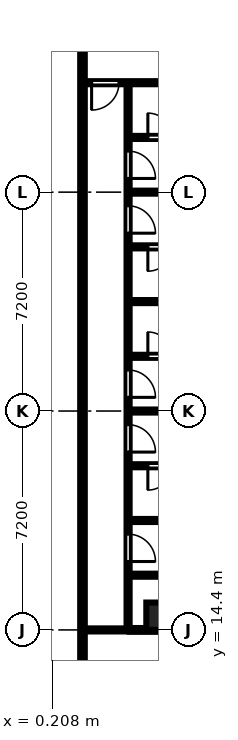
"""IFC4 building model, lengths in metres.
Left out: names, types, materials, properties, quantities, classifications, styles, units other than length and angle.
Written with IfcOpenShell. Run it as: python <this file> out.ifc"""

import sys

from ifc_helpers import new_model, si_unit, direction, frame, frame_2d, origin, origin_2d, place, context, subcontext, project, spatial, rectangle, extrude, element, fill, save


model = new_model("IFC4")
c1 = context("Model", 3, precision=1e-05, world=origin(), true_north=direction((0.0, 1.0)))
c2 = subcontext(c1, "Body", "Model", "MODEL_VIEW")
j1 = project(units=[si_unit("LENGTHUNIT", "METRE"), si_unit("PLANEANGLEUNIT", "RADIAN")], contexts=[c1])
p1 = place(None, origin())
s1 = spatial("IfcSite", under=j1, at=p1, CompositionType="ELEMENT")
p2 = place(p1, origin())
s2 = spatial("IfcBuilding", under=s1, at=p2, CompositionType="ELEMENT")
p3 = place(p2, frame((0.0, 0.0, 35.7)))
s3 = spatial("IfcBuildingStorey", under=s2, at=p3, CompositionType="ELEMENT", Elevation=35.7)
p4 = place(p3, frame((3.75, 14.85, 0.0), z_axis=(0.0, 0.0, 1.0), x_axis=(1.0, 0.0, 0.0)))
e1 = element("IfcColumn", 1, at=p4, inside=s3, PredefinedType="COLUMN", context=c2, shape_type="SweptSolid", body=[
    extrude(rectangle(XDim=0.9, YDim=0.9, at=origin_2d()), origin(), (0.0, 0.0, 1.0), 3.0),
])
p5 = place(p3, frame((1.2, 1.125, 0.0), z_axis=(0.0, 0.0, 1.0), x_axis=(0.0, 1.0, 0.0)))
e2 = element("IfcWall", 2, at=p5, inside=s3, PredefinedType="PARTITIONING", context=c2, shape_type="SweptSolid", body=[
    extrude(rectangle(XDim=35.375, YDim=0.15, at=frame_2d((17.688, 0.0))), origin(), (0.0, 0.0, 1.0), 2.575),
])
p6 = place(p5, frame((4.125, 0.0, 0.0)))
e3 = element("IfcOpeningElement", 3, at=p6, cuts=e2, PredefinedType="OPENING", context=c2, shape_type="SweptSolid", body=[
    extrude(rectangle(XDim=0.9, YDim=2.1, at=frame_2d((0.45, 1.05))), frame((0.0, 0.085, 0.0), z_axis=(0.0, -1.0, 0.0), x_axis=(1.0, 0.0, 0.0)), (0.0, 0.0, 1.0), 0.17),
])
p7 = place(p5, frame((7.025, 0.0, 0.0)))
e4 = element("IfcOpeningElement", 4, at=p7, cuts=e2, PredefinedType="OPENING", context=c2, shape_type="SweptSolid", body=[
    extrude(rectangle(XDim=0.9, YDim=2.1, at=frame_2d((0.45, 1.05))), frame((0.0, 0.085, 0.0), z_axis=(0.0, -1.0, 0.0), x_axis=(1.0, 0.0, 0.0)), (0.0, 0.0, 1.0), 0.17),
])
p8 = place(p5, frame((10.625, 0.0, 0.0)))
e5 = element("IfcOpeningElement", 5, at=p8, cuts=e2, PredefinedType="OPENING", context=c2, shape_type="SweptSolid", body=[
    extrude(rectangle(XDim=0.9, YDim=2.1, at=frame_2d((0.45, 1.05))), frame((0.0, 0.085, 0.0), z_axis=(0.0, -1.0, 0.0), x_axis=(1.0, 0.0, 0.0)), (0.0, 0.0, 1.0), 0.17),
])
p9 = place(p5, frame((32.825, 0.0, 0.0)))
e6 = element("IfcOpeningElement", 6, at=p9, cuts=e2, PredefinedType="OPENING", context=c2, shape_type="SweptSolid", body=[
    extrude(rectangle(XDim=1.0, YDim=2.1, at=frame_2d((0.5, 1.05))), frame((0.0, 0.085, 0.0), z_axis=(0.0, -1.0, 0.0), x_axis=(1.0, 0.0, 0.0)), (0.0, 0.0, 1.0), 0.17),
])
p10 = place(p3, frame((1.275, 14.4, 0.0), z_axis=(0.0, 0.0, 1.0), x_axis=(1.0, 0.0, 0.0)))
e7 = element("IfcWall", 7, at=p10, inside=s3, PredefinedType="PARTITIONING", context=c2, shape_type="SweptSolid", body=[
    extrude(rectangle(XDim=1.425, YDim=0.1, at=frame_2d((0.712, 0.0))), origin(), (0.0, 0.0, 1.0), 2.575),
])
p11 = place(p3, frame((1.275, 32.4, 0.0), z_axis=(0.0, 0.0, 1.0), x_axis=(1.0, 0.0, 0.0)))
e8 = element("IfcWall", 8, at=p11, inside=s3, PredefinedType="PARTITIONING", context=c2, shape_type="SweptSolid", body=[
    extrude(rectangle(XDim=5.625, YDim=0.1, at=frame_2d((2.812, 0.0))), origin(), (0.0, 0.0, 1.0), 2.575),
])
p12 = place(p11, frame((0.225, 0.0, 0.0)))
e9 = element("IfcOpeningElement", 9, at=p12, cuts=e8, PredefinedType="OPENING", context=c2, shape_type="SweptSolid", body=[
    extrude(rectangle(XDim=0.9, YDim=2.1, at=frame_2d((0.45, 1.05))), frame((0.0, 0.06, 0.0), z_axis=(0.0, -1.0, 0.0), x_axis=(1.0, 0.0, 0.0)), (0.0, 0.0, 1.0), 0.12),
])
p13 = place(p3, frame((2.7, 14.462, 0.0), z_axis=(0.0, 0.0, 1.0), x_axis=(0.0, 1.0, 0.0)))
e10 = element("IfcWall", 10, at=p13, inside=s3, PredefinedType="PARTITIONING", context=c2, shape_type="SweptSolid", body=[
    extrude(rectangle(XDim=17.888, YDim=0.1, at=frame_2d((8.944, 0.0))), origin(), (0.0, 0.0, 1.0), 2.575),
])
p14 = place(p13, frame((2.188, 0.0, 0.0)))
e11 = element("IfcOpeningElement", 11, at=p14, cuts=e10, PredefinedType="OPENING", context=c2, shape_type="SweptSolid", body=[
    extrude(rectangle(XDim=0.9, YDim=2.1, at=frame_2d((0.45, 1.05))), frame((0.0, 0.06, 0.0), z_axis=(0.0, -1.0, 0.0), x_axis=(1.0, 0.0, 0.0)), (0.0, 0.0, 1.0), 0.12),
])
p15 = place(p13, frame((5.788, 0.0, 0.0)))
e12 = element("IfcOpeningElement", 12, at=p15, cuts=e10, PredefinedType="OPENING", context=c2, shape_type="SweptSolid", body=[
    extrude(rectangle(XDim=0.9, YDim=2.1, at=frame_2d((0.45, 1.05))), frame((0.0, 0.06, 0.0), z_axis=(0.0, -1.0, 0.0), x_axis=(1.0, 0.0, 0.0)), (0.0, 0.0, 1.0), 0.12),
])
p16 = place(p13, frame((7.587, 0.0, 0.0)))
e13 = element("IfcOpeningElement", 13, at=p16, cuts=e10, PredefinedType="OPENING", context=c2, shape_type="SweptSolid", body=[
    extrude(rectangle(XDim=0.9, YDim=2.1, at=frame_2d((0.45, 1.05))), frame((0.0, 0.06, 0.0), z_axis=(0.0, -1.0, 0.0), x_axis=(1.0, 0.0, 0.0)), (0.0, 0.0, 1.0), 0.12),
])
p17 = place(p13, frame((12.988, 0.0, 0.0)))
e14 = element("IfcOpeningElement", 14, at=p17, cuts=e10, PredefinedType="OPENING", context=c2, shape_type="SweptSolid", body=[
    extrude(rectangle(XDim=0.9, YDim=2.1, at=frame_2d((0.45, 1.05))), frame((0.0, 0.06, 0.0), z_axis=(0.0, -1.0, 0.0), x_axis=(1.0, 0.0, 0.0)), (0.0, 0.0, 1.0), 0.12),
])
p18 = place(p13, frame((14.788, 0.0, 0.0)))
e15 = element("IfcOpeningElement", 15, at=p18, cuts=e10, PredefinedType="OPENING", context=c2, shape_type="SweptSolid", body=[
    extrude(rectangle(XDim=0.9, YDim=2.1, at=frame_2d((0.45, 1.05))), frame((0.0, 0.06, 0.0), z_axis=(0.0, -1.0, 0.0), x_axis=(1.0, 0.0, 0.0)), (0.0, 0.0, 1.0), 0.12),
])
p19 = place(p3, frame((2.7, 14.4, 0.0), z_axis=(0.0, 0.0, 1.0), x_axis=(1.0, 0.0, 0.0)))
e16 = element("IfcWall", 16, at=p19, inside=s3, PredefinedType="PARTITIONING", context=c2, shape_type="SweptSolid", body=[
    extrude(rectangle(XDim=1.2, YDim=0.125, at=frame_2d((0.6, 0.0))), origin(), (0.0, 0.0, 1.0), 2.575),
])
p20 = place(p3, frame((2.75, 16.2, 0.0), z_axis=(0.0, 0.0, 1.0), x_axis=(1.0, 0.0, 0.0)))
e17 = element("IfcWall", 17, at=p20, inside=s3, PredefinedType="PARTITIONING", context=c2, shape_type="SweptSolid", body=[
    extrude(rectangle(XDim=2.1, YDim=0.1, at=frame_2d((1.05, 0.0))), origin(), (0.0, 0.0, 1.0), 2.575),
])
p21 = place(p3, frame((2.75, 18.0, 0.0), z_axis=(0.0, 0.0, 1.0), x_axis=(1.0, 0.0, 0.0)))
e18 = element("IfcWall", 18, at=p21, inside=s3, PredefinedType="PARTITIONING", context=c2, shape_type="SweptSolid", body=[
    extrude(rectangle(XDim=4.15, YDim=0.1, at=frame_2d((2.075, 0.0))), origin(), (0.0, 0.0, 1.0), 2.575),
])
p22 = place(p3, frame((2.75, 19.8, 0.0), z_axis=(0.0, 0.0, 1.0), x_axis=(1.0, 0.0, 0.0)))
e19 = element("IfcWall", 19, at=p22, inside=s3, PredefinedType="PARTITIONING", context=c2, shape_type="SweptSolid", body=[
    extrude(rectangle(XDim=2.1, YDim=0.1, at=frame_2d((1.05, 0.0))), origin(), (0.0, 0.0, 1.0), 2.575),
])
p23 = place(p22, frame((0.6, 0.0, 0.0)))
e20 = element("IfcOpeningElement", 20, at=p23, cuts=e19, PredefinedType="OPENING", context=c2, shape_type="SweptSolid", body=[
    extrude(rectangle(XDim=0.8, YDim=2.1, at=frame_2d((0.4, 1.05))), frame((0.0, 0.06, 0.0), z_axis=(0.0, -1.0, 0.0), x_axis=(1.0, 0.0, 0.0)), (0.0, 0.0, 1.0), 0.12),
])
p24 = place(p3, frame((2.75, 21.6, 0.0), z_axis=(0.0, 0.0, 1.0), x_axis=(1.0, 0.0, 0.0)))
e21 = element("IfcWall", 21, at=p24, inside=s3, PredefinedType="PARTITIONING", context=c2, shape_type="SweptSolid", body=[
    extrude(rectangle(XDim=4.15, YDim=0.1, at=frame_2d((2.075, 0.0))), origin(), (0.0, 0.0, 1.0), 2.575),
])
p25 = place(p3, frame((2.75, 23.4, 0.0), z_axis=(0.0, 0.0, 1.0), x_axis=(1.0, 0.0, 0.0)))
e22 = element("IfcWall", 22, at=p25, inside=s3, PredefinedType="PARTITIONING", context=c2, shape_type="SweptSolid", body=[
    extrude(rectangle(XDim=2.1, YDim=0.1, at=frame_2d((1.05, 0.0))), origin(), (0.0, 0.0, 1.0), 2.575),
])
p26 = place(p25, frame((0.6, 0.0, 0.0)))
e23 = element("IfcOpeningElement", 23, at=p26, cuts=e22, PredefinedType="OPENING", context=c2, shape_type="SweptSolid", body=[
    extrude(rectangle(XDim=0.8, YDim=2.1, at=frame_2d((0.4, 1.05))), frame((0.0, 0.06, 0.0), z_axis=(0.0, -1.0, 0.0), x_axis=(1.0, 0.0, 0.0)), (0.0, 0.0, 1.0), 0.12),
])
p27 = place(p3, frame((2.75, 25.2, 0.0), z_axis=(0.0, 0.0, 1.0), x_axis=(1.0, 0.0, 0.0)))
e24 = element("IfcWall", 24, at=p27, inside=s3, PredefinedType="PARTITIONING", context=c2, shape_type="SweptSolid", body=[
    extrude(rectangle(XDim=4.15, YDim=0.1, at=frame_2d((2.075, 0.0))), origin(), (0.0, 0.0, 1.0), 2.575),
])
p28 = place(p3, frame((2.75, 27.0, 0.0), z_axis=(0.0, 0.0, 1.0), x_axis=(1.0, 0.0, 0.0)))
e25 = element("IfcWall", 25, at=p28, inside=s3, PredefinedType="PARTITIONING", context=c2, shape_type="SweptSolid", body=[
    extrude(rectangle(XDim=2.1, YDim=0.1, at=frame_2d((1.05, 0.0))), origin(), (0.0, 0.0, 1.0), 2.575),
])
p29 = place(p28, frame((0.6, 0.0, 0.0)))
e26 = element("IfcOpeningElement", 26, at=p29, cuts=e25, PredefinedType="OPENING", context=c2, shape_type="SweptSolid", body=[
    extrude(rectangle(XDim=0.8, YDim=2.1, at=frame_2d((0.4, 1.05))), frame((0.0, 0.06, 0.0), z_axis=(0.0, -1.0, 0.0), x_axis=(1.0, 0.0, 0.0)), (0.0, 0.0, 1.0), 0.12),
])
p30 = place(p3, frame((2.75, 28.8, 0.0), z_axis=(0.0, 0.0, 1.0), x_axis=(1.0, 0.0, 0.0)))
e27 = element("IfcWall", 27, at=p30, inside=s3, PredefinedType="PARTITIONING", context=c2, shape_type="SweptSolid", body=[
    extrude(rectangle(XDim=4.15, YDim=0.1, at=frame_2d((2.075, 0.0))), origin(), (0.0, 0.0, 1.0), 2.575),
])
p31 = place(p3, frame((2.75, 30.6, 0.0), z_axis=(0.0, 0.0, 1.0), x_axis=(1.0, 0.0, 0.0)))
e28 = element("IfcWall", 28, at=p31, inside=s3, PredefinedType="PARTITIONING", context=c2, shape_type="SweptSolid", body=[
    extrude(rectangle(XDim=2.1, YDim=0.1, at=frame_2d((1.05, 0.0))), origin(), (0.0, 0.0, 1.0), 2.575),
])
p32 = place(p31, frame((0.6, 0.0, 0.0)))
e29 = element("IfcOpeningElement", 29, at=p32, cuts=e28, PredefinedType="OPENING", context=c2, shape_type="SweptSolid", body=[
    extrude(rectangle(XDim=0.8, YDim=2.1, at=frame_2d((0.4, 1.05))), frame((0.0, 0.06, 0.0), z_axis=(0.0, -1.0, 0.0), x_axis=(1.0, 0.0, 0.0)), (0.0, 0.0, 1.0), 0.12),
])
p33 = place(p12, frame((0.9, 0.0, 0.0), z_axis=(0.0, 0.0, 1.0), x_axis=(-1.0, 0.0, 0.0)))
e30 = element("IfcDoor", 30, at=p33, inside=s3, OperationType="SINGLE_SWING_RIGHT", PredefinedType="DOOR", context=c2, shape_type="SweptSolid", body=[
    extrude(rectangle(XDim=0.9, YDim=2.1, at=frame_2d((0.45, 1.05))), frame((0.0, 0.025, 0.0), z_axis=(0.0, -1.0, 0.0), x_axis=(1.0, 0.0, 0.0)), (0.0, 0.0, 1.0), 0.05),
])
fill(e9, e30)
p34 = place(p14, frame((0.9, 0.0, 0.0), z_axis=(0.0, 0.0, 1.0), x_axis=(-1.0, 0.0, 0.0)))
e31 = element("IfcDoor", 31, at=p34, inside=s3, OperationType="SINGLE_SWING_RIGHT", PredefinedType="DOOR", context=c2, shape_type="SweptSolid", body=[
    extrude(rectangle(XDim=0.9, YDim=2.1, at=frame_2d((0.45, 1.05))), frame((0.0, 0.025, 0.0), z_axis=(0.0, -1.0, 0.0), x_axis=(1.0, 0.0, 0.0)), (0.0, 0.0, 1.0), 0.05),
])
fill(e11, e31)
p35 = place(p15, frame((0.9, 0.0, 0.0), z_axis=(0.0, 0.0, 1.0), x_axis=(-1.0, 0.0, 0.0)))
e32 = element("IfcDoor", 32, at=p35, inside=s3, OperationType="SINGLE_SWING_RIGHT", PredefinedType="DOOR", context=c2, shape_type="SweptSolid", body=[
    extrude(rectangle(XDim=0.9, YDim=2.1, at=frame_2d((0.45, 1.05))), frame((0.0, 0.025, 0.0), z_axis=(0.0, -1.0, 0.0), x_axis=(1.0, 0.0, 0.0)), (0.0, 0.0, 1.0), 0.05),
])
fill(e12, e32)
p36 = place(p16, frame((0.9, 0.0, 0.0), z_axis=(0.0, 0.0, 1.0), x_axis=(-1.0, 0.0, 0.0)))
e33 = element("IfcDoor", 33, at=p36, inside=s3, OperationType="SINGLE_SWING_RIGHT", PredefinedType="DOOR", context=c2, shape_type="SweptSolid", body=[
    extrude(rectangle(XDim=0.9, YDim=2.1, at=frame_2d((0.45, 1.05))), frame((0.0, 0.025, 0.0), z_axis=(0.0, -1.0, 0.0), x_axis=(1.0, 0.0, 0.0)), (0.0, 0.0, 1.0), 0.05),
])
fill(e13, e33)
p37 = place(p17, frame((0.9, 0.0, 0.0), z_axis=(0.0, 0.0, 1.0), x_axis=(-1.0, 0.0, 0.0)))
e34 = element("IfcDoor", 34, at=p37, inside=s3, OperationType="SINGLE_SWING_RIGHT", PredefinedType="DOOR", context=c2, shape_type="SweptSolid", body=[
    extrude(rectangle(XDim=0.9, YDim=2.1, at=frame_2d((0.45, 1.05))), frame((0.0, 0.025, 0.0), z_axis=(0.0, -1.0, 0.0), x_axis=(1.0, 0.0, 0.0)), (0.0, 0.0, 1.0), 0.05),
])
fill(e14, e34)
p38 = place(p18, frame((0.9, 0.0, 0.0), z_axis=(0.0, 0.0, 1.0), x_axis=(-1.0, 0.0, 0.0)))
e35 = element("IfcDoor", 35, at=p38, inside=s3, OperationType="SINGLE_SWING_RIGHT", PredefinedType="DOOR", context=c2, shape_type="SweptSolid", body=[
    extrude(rectangle(XDim=0.9, YDim=2.1, at=frame_2d((0.45, 1.05))), frame((0.0, 0.025, 0.0), z_axis=(0.0, -1.0, 0.0), x_axis=(1.0, 0.0, 0.0)), (0.0, 0.0, 1.0), 0.05),
])
fill(e15, e35)
p39 = place(p23, frame((0.8, 0.0, 0.0), z_axis=(0.0, 0.0, 1.0), x_axis=(-1.0, 0.0, 0.0)))
e36 = element("IfcDoor", 36, at=p39, inside=s3, OperationType="SINGLE_SWING_RIGHT", PredefinedType="DOOR", context=c2, shape_type="SweptSolid", body=[
    extrude(rectangle(XDim=0.8, YDim=2.1, at=frame_2d((0.4, 1.05))), frame((0.0, 0.025, 0.0), z_axis=(0.0, -1.0, 0.0), x_axis=(1.0, 0.0, 0.0)), (0.0, 0.0, 1.0), 0.05),
])
fill(e20, e36)
p40 = place(p26, origin())
e37 = element("IfcDoor", 37, at=p40, inside=s3, OperationType="SINGLE_SWING_LEFT", PredefinedType="DOOR", context=c2, shape_type="SweptSolid", body=[
    extrude(rectangle(XDim=0.8, YDim=2.1, at=frame_2d((0.4, 1.05))), frame((0.0, 0.025, 0.0), z_axis=(0.0, -1.0, 0.0), x_axis=(1.0, 0.0, 0.0)), (0.0, 0.0, 1.0), 0.05),
])
fill(e23, e37)
p41 = place(p29, frame((0.8, 0.0, 0.0), z_axis=(0.0, 0.0, 1.0), x_axis=(-1.0, 0.0, 0.0)))
e38 = element("IfcDoor", 38, at=p41, inside=s3, OperationType="SINGLE_SWING_RIGHT", PredefinedType="DOOR", context=c2, shape_type="SweptSolid", body=[
    extrude(rectangle(XDim=0.8, YDim=2.1, at=frame_2d((0.4, 1.05))), frame((0.0, 0.025, 0.0), z_axis=(0.0, -1.0, 0.0), x_axis=(1.0, 0.0, 0.0)), (0.0, 0.0, 1.0), 0.05),
])
fill(e26, e38)
p42 = place(p32, origin())
e39 = element("IfcDoor", 39, at=p42, inside=s3, OperationType="SINGLE_SWING_LEFT", PredefinedType="DOOR", context=c2, shape_type="SweptSolid", body=[
    extrude(rectangle(XDim=0.8, YDim=2.1, at=frame_2d((0.4, 1.05))), frame((0.0, 0.025, 0.0), z_axis=(0.0, -1.0, 0.0), x_axis=(1.0, 0.0, 0.0)), (0.0, 0.0, 1.0), 0.05),
])
fill(e29, e39)
save(model, sys.argv[1])
